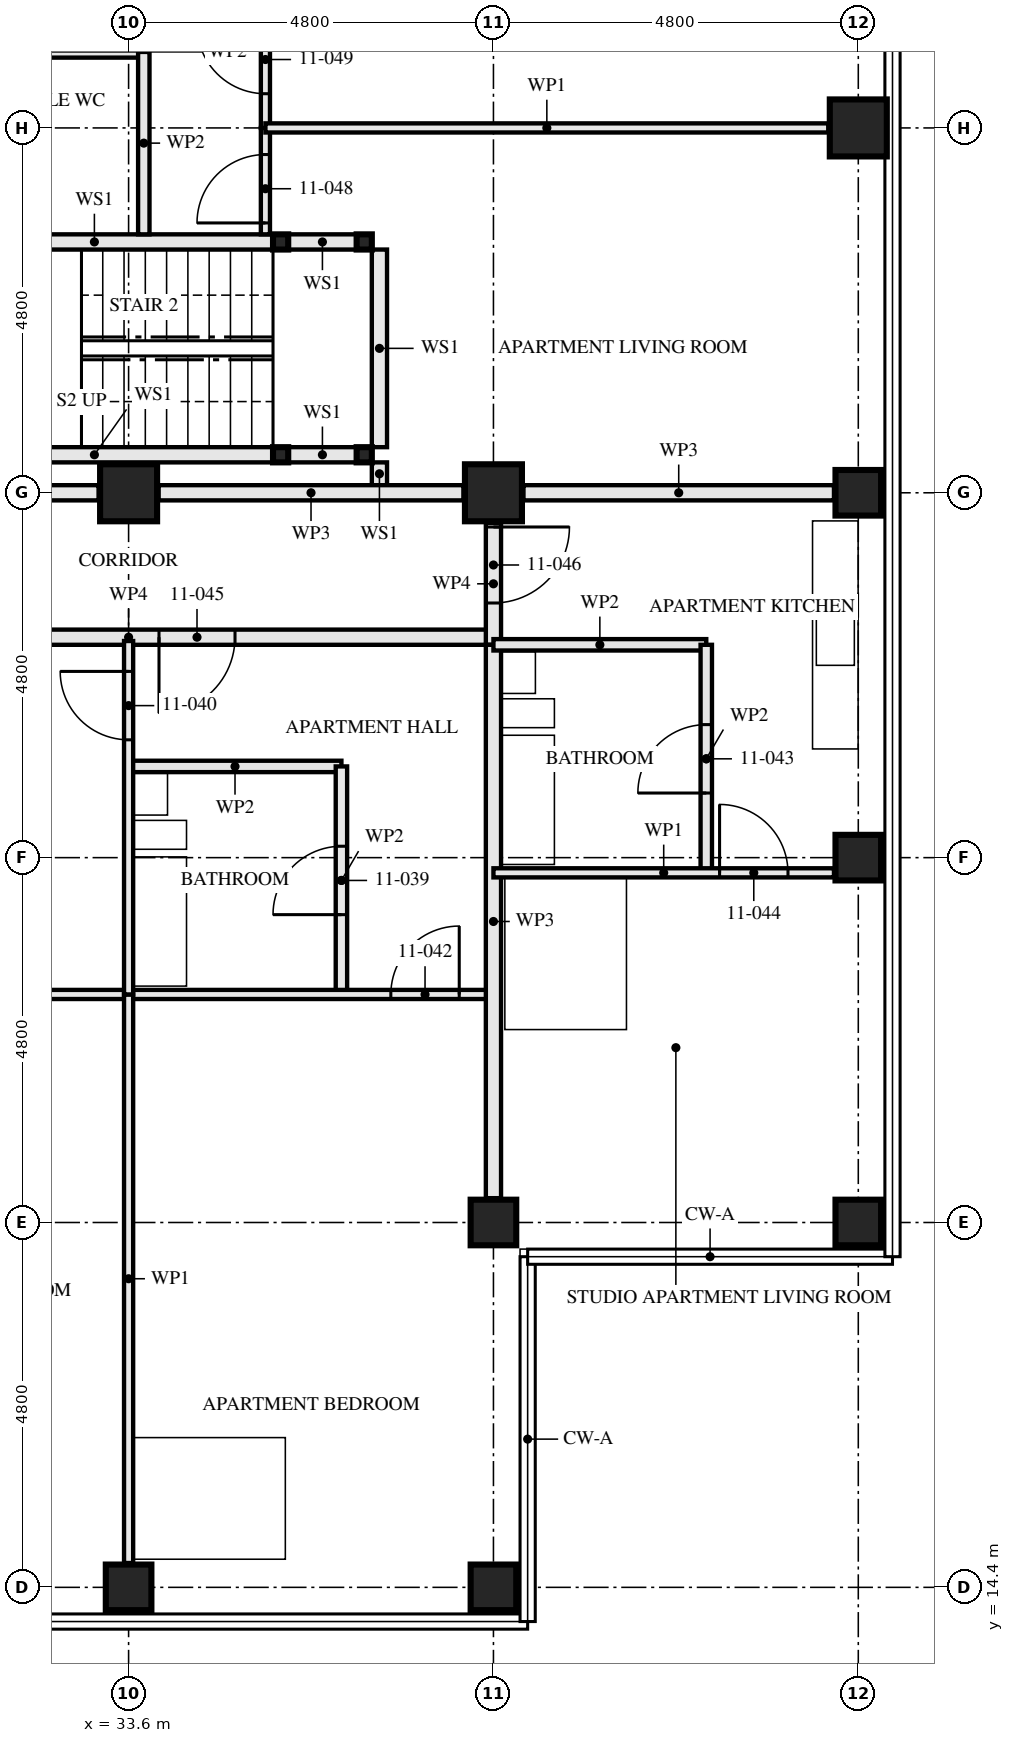
"""IFC4 building model, lengths in metres.
Left out: names, types, materials, properties, quantities, classifications, styles, units other than length and angle.
Written with IfcOpenShell. Run it as: python <this file> out.ifc"""

import sys

from ifc_helpers import new_model, si_unit, direction, frame, frame_2d, origin, origin_2d, place, context, subcontext, project, spatial, rectangle, hollow_rectangle, extrude, element, fill, save


model = new_model("IFC4")
c1 = context("Model", 3, precision=1e-05, world=origin(), true_north=direction((0.0, 1.0)))
c2 = subcontext(c1, "Body", "Model", "MODEL_VIEW")
j1 = project(units=[si_unit("LENGTHUNIT", "METRE"), si_unit("PLANEANGLEUNIT", "RADIAN")], contexts=[c1])
p1 = place(None, origin())
s1 = spatial("IfcSite", under=j1, at=p1, CompositionType="ELEMENT")
p2 = place(p1, origin())
s2 = spatial("IfcBuilding", under=s1, at=p2, CompositionType="ELEMENT")
p3 = place(p2, frame((0.0, 0.0, 44.5)))
s3 = spatial("IfcBuildingStorey", under=s2, at=p3, CompositionType="ELEMENT", Elevation=44.5)
p4 = place(p3, frame((33.6, 14.4, 0.0), z_axis=(0.0, 0.0, 1.0), x_axis=(0.0, 1.0, 0.0)))
e1 = element("IfcColumn", 1, at=p4, inside=s3, PredefinedType="COLUMN", context=c2, shape_type="SweptSolid", body=[
    extrude(hollow_rectangle(XDim=0.6, YDim=0.6, WallThickness=0.08, at=origin_2d()), origin(), (0.0, 0.0, 1.0), 3.5),
])
p5 = place(p3, frame((33.6, 28.8, 0.0), z_axis=(0.0, 0.0, 1.0), x_axis=(0.0, 1.0, 0.0)))
e2 = element("IfcColumn", 2, at=p5, inside=s3, PredefinedType="COLUMN", context=c2, shape_type="SweptSolid", body=[
    extrude(hollow_rectangle(XDim=0.75, YDim=0.75, WallThickness=0.08, at=origin_2d()), origin(), (0.0, 0.0, 1.0), 3.5),
])
for number, where, z_axis, x_axis in (
    (3, (38.4, 14.4, 0.0), (0.0, 0.0, 1.0), (0.0, 1.0, 0.0)),
    (4, (38.4, 19.2, 0.0), (0.0, 0.0, 1.0), (0.0, 1.0, 0.0)),
):
    element("IfcColumn", number, at=place(p3, frame(where, z_axis=z_axis, x_axis=x_axis)), inside=s3, PredefinedType="COLUMN", context=c2, shape_type="SweptSolid", body=[
        extrude(hollow_rectangle(XDim=0.6, YDim=0.6, WallThickness=0.06, at=origin_2d()), origin(), (0.0, 0.0, 1.0), 3.5),
    ])
p6 = place(p3, frame((38.4, 28.8, 0.0), z_axis=(0.0, 0.0, 1.0), x_axis=(0.0, 1.0, 0.0)))
e5 = element("IfcColumn", 5, at=p6, inside=s3, PredefinedType="COLUMN", context=c2, shape_type="SweptSolid", body=[
    extrude(hollow_rectangle(XDim=0.75, YDim=0.75, WallThickness=0.08, at=origin_2d()), origin(), (0.0, 0.0, 1.0), 3.5),
])
p7 = place(p3, frame((43.2, 19.2, 0.0), z_axis=(0.0, 0.0, 1.0), x_axis=(0.0, 1.0, 0.0)))
e6 = element("IfcColumn", 6, at=p7, inside=s3, PredefinedType="COLUMN", context=c2, shape_type="SweptSolid", body=[
    extrude(hollow_rectangle(XDim=0.6, YDim=0.6, WallThickness=0.06, at=origin_2d()), origin(), (0.0, 0.0, 1.0), 3.5),
])
for number, where, z_axis, x_axis in (
    (7, (43.2, 24.0, 0.0), (0.0, 0.0, 1.0), (1.0, 0.0, 0.0)),
    (8, (43.2, 28.8, 0.0), (0.0, 0.0, 1.0), (0.0, 1.0, 0.0)),
):
    element("IfcColumn", number, at=place(p3, frame(where, z_axis=z_axis, x_axis=x_axis)), inside=s3, PredefinedType="COLUMN", context=c2, shape_type="SweptSolid", body=[
        extrude(hollow_rectangle(XDim=0.6, YDim=0.6, WallThickness=0.08, at=origin_2d()), origin(), (0.0, 0.0, 1.0), 3.5),
    ])
p8 = place(p3, frame((43.2, 33.6, 0.0), z_axis=(0.0, 0.0, 1.0), x_axis=(1.0, 0.0, 0.0)))
e9 = element("IfcColumn", 9, at=p8, inside=s3, PredefinedType="COLUMN", context=c2, shape_type="SweptSolid", body=[
    extrude(hollow_rectangle(XDim=0.75, YDim=0.75, WallThickness=0.08, at=origin_2d()), origin(), (0.0, 0.0, 1.0), 3.5),
])
for number, where, z_axis, x_axis in (
    (10, (36.7, 29.3, 0.0), (0.0, 0.0, 1.0), (1.0, 0.0, 0.0)),
    (11, (36.7, 32.1, 0.0), (0.0, 0.0, 1.0), (1.0, 0.0, 0.0)),
    (12, (35.6, 29.3, 0.0), (0.0, 0.0, 1.0), (1.0, 0.0, 0.0)),
    (13, (35.6, 32.1, 0.0), (0.0, 0.0, 1.0), (1.0, 0.0, 0.0)),
):
    element("IfcColumn", number, at=place(p3, frame(where, z_axis=z_axis, x_axis=x_axis)), inside=s3, PredefinedType="COLUMN", context=c2, shape_type="SweptSolid", body=[
        extrude(hollow_rectangle(XDim=0.2, YDim=0.2, WallThickness=0.008, at=origin_2d()), origin(), (0.0, 0.0, 1.0), 3.33),
    ])
p9 = place(p3, frame((36.4, 22.2, 0.0), z_axis=(0.0, 0.0, 1.0), x_axis=(0.0, 1.0, 0.0)))
e14 = element("IfcWall", 14, at=p9, inside=s3, PredefinedType="PARTITIONING", context=c2, shape_type="SweptSolid", body=[
    extrude(rectangle(XDim=3.0, YDim=0.15, at=frame_2d((1.5, 0.0))), origin(), (0.0, 0.0, 1.0), 2.55),
])
p10 = place(p9, frame((1.05, 0.0, 0.0)))
e15 = element("IfcOpeningElement", 15, at=p10, cuts=e14, PredefinedType="OPENING", context=c2, shape_type="SweptSolid", body=[
    extrude(rectangle(XDim=0.9, YDim=2.1, at=frame_2d((0.45, 1.05))), frame((0.0, 0.085, 0.0), z_axis=(0.0, -1.0, 0.0), x_axis=(1.0, 0.0, 0.0)), (0.0, 0.0, 1.0), 0.171),
])
p11 = place(p3, frame((33.6, 25.2, 0.0), z_axis=(0.0, 0.0, 1.0), x_axis=(1.0, 0.0, 0.0)))
e16 = element("IfcWall", 16, at=p11, inside=s3, PredefinedType="PARTITIONING", context=c2, shape_type="SweptSolid", body=[
    extrude(rectangle(XDim=2.8, YDim=0.15, at=frame_2d((1.4, 0.0))), origin(), (0.0, 0.0, 1.0), 3.33),
])
p12 = place(p3, frame((33.6, 22.2, 0.0), z_axis=(0.0, 0.0, 1.0), x_axis=(0.0, 1.0, 0.0)))
e17 = element("IfcWall", 17, at=p12, inside=s3, PredefinedType="PARTITIONING", context=c2, shape_type="SweptSolid", body=[
    extrude(rectangle(XDim=4.65, YDim=0.12, at=frame_2d((2.325, 0.0))), origin(), (0.0, 0.0, 1.0), 2.55),
])
p13 = place(p12, frame((3.35, 0.0, 0.0)))
e18 = element("IfcOpeningElement", 18, at=p13, cuts=e17, PredefinedType="OPENING", context=c2, shape_type="SweptSolid", body=[
    extrude(rectangle(XDim=0.9, YDim=2.1, at=frame_2d((0.45, 1.05))), frame((0.0, 0.071, 0.0), z_axis=(0.0, -1.0, 0.0), x_axis=(1.0, 0.0, 0.0)), (0.0, 0.0, 1.0), 0.141),
])
p14 = place(p3, frame((28.8, 22.2, 0.0), z_axis=(0.0, 0.0, 1.0), x_axis=(1.0, 0.0, 0.0)))
e19 = element("IfcWall", 19, at=p14, inside=s3, PredefinedType="PARTITIONING", context=c2, shape_type="SweptSolid", body=[
    extrude(rectangle(XDim=4.8, YDim=0.12, at=frame_2d((2.4, 0.0))), origin(), (0.0, 0.0, 1.0), 3.33),
])
p15 = place(p14, frame((0.45, 0.0, 0.0)))
e20 = element("IfcOpeningElement", 20, at=p15, cuts=e19, PredefinedType="OPENING", context=c2, shape_type="SweptSolid", body=[
    extrude(rectangle(XDim=0.9, YDim=2.1, at=frame_2d((0.45, 1.05))), frame((0.0, 0.071, 0.0), z_axis=(0.0, -1.0, 0.0), x_axis=(1.0, 0.0, 0.0)), (0.0, 0.0, 1.0), 0.141),
])
p16 = place(p3, frame((33.6, 22.2, 0.0), z_axis=(0.0, 0.0, 1.0), x_axis=(1.0, 0.0, 0.0)))
e21 = element("IfcWall", 21, at=p16, inside=s3, PredefinedType="PARTITIONING", context=c2, shape_type="SweptSolid", body=[
    extrude(rectangle(XDim=4.8, YDim=0.12, at=frame_2d((2.4, 0.0))), origin(), (0.0, 0.0, 1.0), 3.33),
])
p17 = place(p16, frame((3.45, 0.0, 0.0)))
e22 = element("IfcOpeningElement", 22, at=p17, cuts=e21, PredefinedType="OPENING", context=c2, shape_type="SweptSolid", body=[
    extrude(rectangle(XDim=0.9, YDim=2.1, at=frame_2d((0.45, 1.05))), frame((0.0, 0.071, 0.0), z_axis=(0.0, -1.0, 0.0), x_axis=(1.0, 0.0, 0.0)), (0.0, 0.0, 1.0), 0.141),
])
p18 = place(p3, frame((33.6, 14.72, 0.0), z_axis=(0.0, 0.0, 1.0), x_axis=(0.0, 1.0, 0.0)))
e23 = element("IfcWall", 23, at=p18, inside=s3, PredefinedType="PARTITIONING", context=c2, shape_type="SweptSolid", body=[
    extrude(rectangle(XDim=7.48, YDim=0.12, at=frame_2d((3.74, 0.0))), origin(), (0.0, 0.0, 1.0), 2.55),
])
p19 = place(p3, frame((38.4, 19.52, 0.0), z_axis=(0.0, 0.0, 1.0), x_axis=(0.0, 1.0, 0.0)))
e24 = element("IfcWall", 24, at=p19, inside=s3, PredefinedType="PARTITIONING", context=c2, shape_type="SweptSolid", body=[
    extrude(rectangle(XDim=7.28, YDim=0.2, at=frame_2d((3.64, 0.0))), origin(), (0.0, 0.0, 1.0), 2.55),
])
p20 = place(p3, frame((41.2, 23.8, 0.0), z_axis=(0.0, 0.0, 1.0), x_axis=(0.0, 1.0, 0.0)))
e25 = element("IfcWall", 25, at=p20, inside=s3, PredefinedType="PARTITIONING", context=c2, shape_type="SweptSolid", body=[
    extrude(rectangle(XDim=3.0, YDim=0.15, at=frame_2d((1.5, 0.0))), origin(), (0.0, 0.0, 1.0), 2.55),
])
p21 = place(p20, frame((1.05, 0.0, 0.0)))
e26 = element("IfcOpeningElement", 26, at=p21, cuts=e25, PredefinedType="OPENING", context=c2, shape_type="SweptSolid", body=[
    extrude(rectangle(XDim=0.9, YDim=2.1, at=frame_2d((0.45, 1.05))), frame((0.0, 0.085, 0.0), z_axis=(0.0, -1.0, 0.0), x_axis=(1.0, 0.0, 0.0)), (0.0, 0.0, 1.0), 0.171),
])
p22 = place(p3, frame((38.4, 26.8, 0.0), z_axis=(0.0, 0.0, 1.0), x_axis=(1.0, 0.0, 0.0)))
e27 = element("IfcWall", 27, at=p22, inside=s3, PredefinedType="PARTITIONING", context=c2, shape_type="SweptSolid", body=[
    extrude(rectangle(XDim=2.8, YDim=0.15, at=frame_2d((1.4, 0.0))), origin(), (0.0, 0.0, 1.0), 3.33),
])
p23 = place(p3, frame((38.4, 23.8, 0.0), z_axis=(0.0, 0.0, 1.0), x_axis=(1.0, 0.0, 0.0)))
e28 = element("IfcWall", 28, at=p23, inside=s3, PredefinedType="PARTITIONING", context=c2, shape_type="SweptSolid", body=[
    extrude(rectangle(XDim=4.48, YDim=0.12, at=frame_2d((2.24, 0.0))), origin(), (0.0, 0.0, 1.0), 3.33),
])
p24 = place(p23, frame((2.975, 0.0, 0.0)))
e29 = element("IfcOpeningElement", 29, at=p24, cuts=e28, PredefinedType="OPENING", context=c2, shape_type="SweptSolid", body=[
    extrude(rectangle(XDim=0.9, YDim=2.1, at=frame_2d((0.45, 1.05))), frame((0.0, 0.071, 0.0), z_axis=(0.0, -1.0, 0.0), x_axis=(1.0, 0.0, 0.0)), (0.0, 0.0, 1.0), 0.141),
])
p25 = place(p3, frame((28.8, 26.9, 0.0), z_axis=(0.0, 0.0, 1.0), x_axis=(1.0, 0.0, 0.0)))
e30 = element("IfcWall", 30, at=p25, inside=s3, PredefinedType="PARTITIONING", context=c2, shape_type="SweptSolid", body=[
    extrude(rectangle(XDim=9.6, YDim=0.2, at=frame_2d((4.8, 0.0))), origin(), (0.0, 0.0, 1.0), 3.33),
])
p26 = place(p25, frame((5.2, 0.0, 0.0)))
e31 = element("IfcOpeningElement", 31, at=p26, cuts=e30, PredefinedType="OPENING", context=c2, shape_type="SweptSolid", body=[
    extrude(rectangle(XDim=1.0, YDim=2.1, at=frame_2d((0.5, 1.05))), frame((0.0, 0.111, 0.0), z_axis=(0.0, -1.0, 0.0), x_axis=(1.0, 0.0, 0.0)), (0.0, 0.0, 1.0), 0.221),
])
p27 = place(p3, frame((38.4, 26.8, 0.0), z_axis=(0.0, 0.0, 1.0), x_axis=(0.0, 1.0, 0.0)))
e32 = element("IfcWall", 32, at=p27, inside=s3, PredefinedType="PARTITIONING", context=c2, shape_type="SweptSolid", body=[
    extrude(rectangle(XDim=1.605, YDim=0.2, at=frame_2d((0.802, 0.0))), origin(), (0.0, 0.0, 1.0), 3.33),
])
p28 = place(p27, frame((0.55, 0.0, 0.0)))
e33 = element("IfcOpeningElement", 33, at=p28, cuts=e32, PredefinedType="OPENING", context=c2, shape_type="SweptSolid", body=[
    extrude(rectangle(XDim=1.0, YDim=2.1, at=frame_2d((0.5, 1.05))), frame((0.0, 0.111, 0.0), z_axis=(0.0, -1.0, 0.0), x_axis=(1.0, 0.0, 0.0)), (0.0, 0.0, 1.0), 0.221),
])
p29 = place(p3, frame((36.6, 29.3, 0.0), z_axis=(0.0, 0.0, 1.0), x_axis=(-1.0, 0.0, 0.0)))
e34 = element("IfcWall", 34, at=p29, inside=s3, PredefinedType="SOLIDWALL", context=c2, shape_type="SweptSolid", body=[
    extrude(rectangle(XDim=0.9, YDim=0.2, at=frame_2d((0.45, 0.0))), origin(), (0.0, 0.0, 1.0), 2.99),
])
p30 = place(p3, frame((35.5, 29.3, 0.0), z_axis=(0.0, 0.0, 1.0), x_axis=(-1.0, 0.0, 0.0)))
e35 = element("IfcWall", 35, at=p30, inside=s3, PredefinedType="SOLIDWALL", context=c2, shape_type="SweptSolid", body=[
    extrude(rectangle(XDim=4.7, YDim=0.2, at=frame_2d((2.35, 0.0))), origin(), (0.0, 0.0, 1.0), 2.99),
])
p31 = place(p3, frame((36.6, 32.1, 0.0), z_axis=(0.0, 0.0, 1.0), x_axis=(-1.0, 0.0, 0.0)))
e36 = element("IfcWall", 36, at=p31, inside=s3, PredefinedType="SOLIDWALL", context=c2, shape_type="SweptSolid", body=[
    extrude(rectangle(XDim=0.9, YDim=0.2, at=frame_2d((0.45, 0.0))), origin(), (0.0, 0.0, 1.0), 2.99),
])
p32 = place(p3, frame((35.5, 32.1, 0.0), z_axis=(0.0, 0.0, 1.0), x_axis=(-1.0, 0.0, 0.0)))
e37 = element("IfcWall", 37, at=p32, inside=s3, PredefinedType="SOLIDWALL", context=c2, shape_type="SweptSolid", body=[
    extrude(rectangle(XDim=4.7, YDim=0.2, at=frame_2d((2.35, 0.0))), origin(), (0.0, 0.0, 1.0), 2.99),
])
p33 = place(p3, frame((36.9, 28.9, 0.0), z_axis=(0.0, 0.0, 1.0), x_axis=(0.0, 1.0, 0.0)))
e38 = element("IfcWall", 38, at=p33, inside=s3, PredefinedType="SOLIDWALL", context=c2, shape_type="SweptSolid", body=[
    extrude(rectangle(XDim=0.3, YDim=0.2, at=frame_2d((0.15, 0.0))), origin(), (0.0, 0.0, 1.0), 3.33),
])
p34 = place(p3, frame((36.9, 29.4, 0.0), z_axis=(0.0, 0.0, 1.0), x_axis=(0.0, 1.0, 0.0)))
e39 = element("IfcWall", 39, at=p34, inside=s3, PredefinedType="SOLIDWALL", context=c2, shape_type="SweptSolid", body=[
    extrude(rectangle(XDim=2.6, YDim=0.2, at=frame_2d((1.3, 0.0))), origin(), (0.0, 0.0, 1.0), 3.33),
])
p35 = place(p3, frame((33.8, 32.2, 0.0), z_axis=(0.0, 0.0, 1.0), x_axis=(0.0, 1.0, 0.0)))
e40 = element("IfcWall", 40, at=p35, inside=s3, PredefinedType="PARTITIONING", context=c2, shape_type="SweptSolid", body=[
    extrude(rectangle(XDim=2.4, YDim=0.15, at=frame_2d((1.2, 0.0))), origin(), (0.0, 0.0, 1.0), 2.55),
])
p36 = place(p3, frame((33.8, 34.6, 0.0), z_axis=(0.0, 0.0, 1.0), x_axis=(-1.0, 0.0, 0.0)))
e41 = element("IfcWall", 41, at=p36, inside=s3, PredefinedType="PARTITIONING", context=c2, shape_type="SweptSolid", body=[
    extrude(rectangle(XDim=3.0, YDim=0.15, at=frame_2d((1.5, 0.0))), origin(), (0.0, 0.0, 1.0), 3.33),
])
p37 = place(p3, frame((35.4, 32.2, 0.0), z_axis=(0.0, 0.0, 1.0), x_axis=(0.0, 1.0, 0.0)))
e42 = element("IfcWall", 42, at=p37, inside=s3, PredefinedType="PARTITIONING", context=c2, shape_type="SweptSolid", body=[
    extrude(rectangle(XDim=1.4, YDim=0.12, at=frame_2d((0.7, 0.0))), origin(), (0.0, 0.0, 1.0), 3.33),
])
p38 = place(p37, frame((0.15, 0.0, 0.0)))
e43 = element("IfcOpeningElement", 43, at=p38, cuts=e42, PredefinedType="OPENING", context=c2, shape_type="SweptSolid", body=[
    extrude(rectangle(XDim=0.9, YDim=2.1, at=frame_2d((0.45, 1.05))), frame((0.0, 0.071, 0.0), z_axis=(0.0, -1.0, 0.0), x_axis=(1.0, 0.0, 0.0)), (0.0, 0.0, 1.0), 0.141),
])
p39 = place(p3, frame((35.4, 33.6, 0.0), z_axis=(0.0, 0.0, 1.0), x_axis=(0.0, 1.0, 0.0)))
e44 = element("IfcWall", 44, at=p39, inside=s3, PredefinedType="PARTITIONING", context=c2, shape_type="SweptSolid", body=[
    extrude(rectangle(XDim=4.8, YDim=0.12, at=frame_2d((2.4, 0.0))), origin(), (0.0, 0.0, 1.0), 3.33),
])
p40 = place(p39, frame((0.45, 0.0, 0.0)))
e45 = element("IfcOpeningElement", 45, at=p40, cuts=e44, PredefinedType="OPENING", context=c2, shape_type="SweptSolid", body=[
    extrude(rectangle(XDim=0.9, YDim=2.1, at=frame_2d((0.45, 1.05))), frame((0.0, 0.071, 0.0), z_axis=(0.0, -1.0, 0.0), x_axis=(1.0, 0.0, 0.0)), (0.0, 0.0, 1.0), 0.141),
])
p41 = place(p3, frame((42.805, 33.6, 0.0), z_axis=(0.0, 0.0, 1.0), x_axis=(-1.0, 0.0, 0.0)))
e46 = element("IfcWall", 46, at=p41, inside=s3, PredefinedType="PARTITIONING", context=c2, shape_type="SweptSolid", body=[
    extrude(rectangle(XDim=7.405, YDim=0.12, at=frame_2d((3.703, 0.0))), origin(), (0.0, 0.0, 1.0), 2.55),
])
p42 = place(p3, frame((42.88, 28.8, 0.0), z_axis=(0.0, 0.0, 1.0), x_axis=(-1.0, 0.0, 0.0)))
e47 = element("IfcWall", 47, at=p42, inside=s3, PredefinedType="PARTITIONING", context=c2, shape_type="SweptSolid", body=[
    extrude(rectangle(XDim=4.085, YDim=0.2, at=frame_2d((2.042, 0.0))), origin(), (0.0, 0.0, 1.0), 2.32),
])
p43 = place(p3, frame((38.005, 28.8, 0.0), z_axis=(0.0, 0.0, 1.0), x_axis=(-1.0, 0.0, 0.0)))
e48 = element("IfcWall", 48, at=p43, inside=s3, PredefinedType="PARTITIONING", context=c2, shape_type="SweptSolid", body=[
    extrude(rectangle(XDim=4.01, YDim=0.2, at=frame_2d((2.005, 0.0))), origin(), (0.0, 0.0, 1.0), 2.32),
])
p44 = place(p3, frame((33.205, 28.8, 0.0), z_axis=(0.0, 0.0, 1.0), x_axis=(-1.0, 0.0, 0.0)))
e49 = element("IfcWall", 49, at=p44, inside=s3, PredefinedType="PARTITIONING", context=c2, shape_type="SweptSolid", body=[
    extrude(rectangle(XDim=2.505, YDim=0.2, at=frame_2d((1.252, 0.0))), origin(), (0.0, 0.0, 1.0), 2.32),
])
p45 = place(p10, origin())
e50 = element("IfcDoor", 50, at=p45, inside=s3, OperationType="SINGLE_SWING_RIGHT", PredefinedType="DOOR", context=c2, shape_type="SweptSolid", body=[
    extrude(rectangle(XDim=0.9, YDim=2.1, at=frame_2d((0.45, 1.05))), frame((0.0, 0.022, 0.0), z_axis=(0.0, -1.0, 0.0), x_axis=(1.0, 0.0, 0.0)), (0.0, 0.0, 1.0), 0.044),
])
fill(e15, e50)
p46 = place(p13, origin())
e51 = element("IfcDoor", 51, at=p46, inside=s3, OperationType="SINGLE_SWING_LEFT", PredefinedType="DOOR", context=c2, shape_type="SweptSolid", body=[
    extrude(rectangle(XDim=0.9, YDim=2.1, at=frame_2d((0.45, 1.05))), frame((0.0, 0.022, 0.0), z_axis=(0.0, -1.0, 0.0), x_axis=(1.0, 0.0, 0.0)), (0.0, 0.0, 1.0), 0.044),
])
fill(e18, e51)
p47 = place(p17, origin())
e52 = element("IfcDoor", 52, at=p47, inside=s3, OperationType="SINGLE_SWING_LEFT", PredefinedType="DOOR", context=c2, shape_type="SweptSolid", body=[
    extrude(rectangle(XDim=0.9, YDim=2.1, at=frame_2d((0.45, 1.05))), frame((0.0, 0.022, 0.0), z_axis=(0.0, -1.0, 0.0), x_axis=(1.0, 0.0, 0.0)), (0.0, 0.0, 1.0), 0.044),
])
fill(e22, e52)
p48 = place(p21, origin())
e53 = element("IfcDoor", 53, at=p48, inside=s3, OperationType="SINGLE_SWING_RIGHT", PredefinedType="DOOR", context=c2, shape_type="SweptSolid", body=[
    extrude(rectangle(XDim=0.9, YDim=2.1, at=frame_2d((0.45, 1.05))), frame((0.0, 0.022, 0.0), z_axis=(0.0, -1.0, 0.0), x_axis=(1.0, 0.0, 0.0)), (0.0, 0.0, 1.0), 0.044),
])
fill(e26, e53)
p49 = place(p24, origin())
e54 = element("IfcDoor", 54, at=p49, inside=s3, OperationType="SINGLE_SWING_RIGHT", PredefinedType="DOOR", context=c2, shape_type="SweptSolid", body=[
    extrude(rectangle(XDim=0.9, YDim=2.1, at=frame_2d((0.45, 1.05))), frame((0.0, 0.022, 0.0), z_axis=(0.0, -1.0, 0.0), x_axis=(1.0, 0.0, 0.0)), (0.0, 0.0, 1.0), 0.044),
])
fill(e29, e54)
p50 = place(p26, frame((1.0, 0.0, 0.0), z_axis=(0.0, 0.0, 1.0), x_axis=(-1.0, 0.0, 0.0)))
e55 = element("IfcDoor", 55, at=p50, inside=s3, OperationType="SINGLE_SWING_LEFT", PredefinedType="DOOR", context=c2, shape_type="SweptSolid", body=[
    extrude(rectangle(XDim=1.0, YDim=2.1, at=frame_2d((0.5, 1.05))), frame((0.0, 0.027, 0.0), z_axis=(0.0, -1.0, 0.0), x_axis=(1.0, 0.0, 0.0)), (0.0, 0.0, 1.0), 0.054),
])
fill(e31, e55)
p51 = place(p28, frame((1.0, 0.0, 0.0), z_axis=(0.0, 0.0, 1.0), x_axis=(-1.0, 0.0, 0.0)))
e56 = element("IfcDoor", 56, at=p51, inside=s3, OperationType="SINGLE_SWING_RIGHT", PredefinedType="DOOR", context=c2, shape_type="SweptSolid", body=[
    extrude(rectangle(XDim=1.0, YDim=2.1, at=frame_2d((0.5, 1.05))), frame((0.0, 0.027, 0.0), z_axis=(0.0, -1.0, 0.0), x_axis=(1.0, 0.0, 0.0)), (0.0, 0.0, 1.0), 0.054),
])
fill(e33, e56)
p52 = place(p38, origin())
e57 = element("IfcDoor", 57, at=p52, inside=s3, OperationType="SINGLE_SWING_RIGHT", PredefinedType="DOOR", context=c2, shape_type="SweptSolid", body=[
    extrude(rectangle(XDim=0.9, YDim=2.1, at=frame_2d((0.45, 1.05))), frame((0.0, 0.022, 0.0), z_axis=(0.0, -1.0, 0.0), x_axis=(1.0, 0.0, 0.0)), (0.0, 0.0, 1.0), 0.044),
])
fill(e43, e57)
p53 = place(p40, origin())
e58 = element("IfcDoor", 58, at=p53, inside=s3, OperationType="SINGLE_SWING_LEFT", PredefinedType="DOOR", context=c2, shape_type="SweptSolid", body=[
    extrude(rectangle(XDim=0.9, YDim=2.1, at=frame_2d((0.45, 1.05))), frame((0.0, 0.022, 0.0), z_axis=(0.0, -1.0, 0.0), x_axis=(1.0, 0.0, 0.0)), (0.0, 0.0, 1.0), 0.044),
])
fill(e45, e58)
save(model, sys.argv[1])
